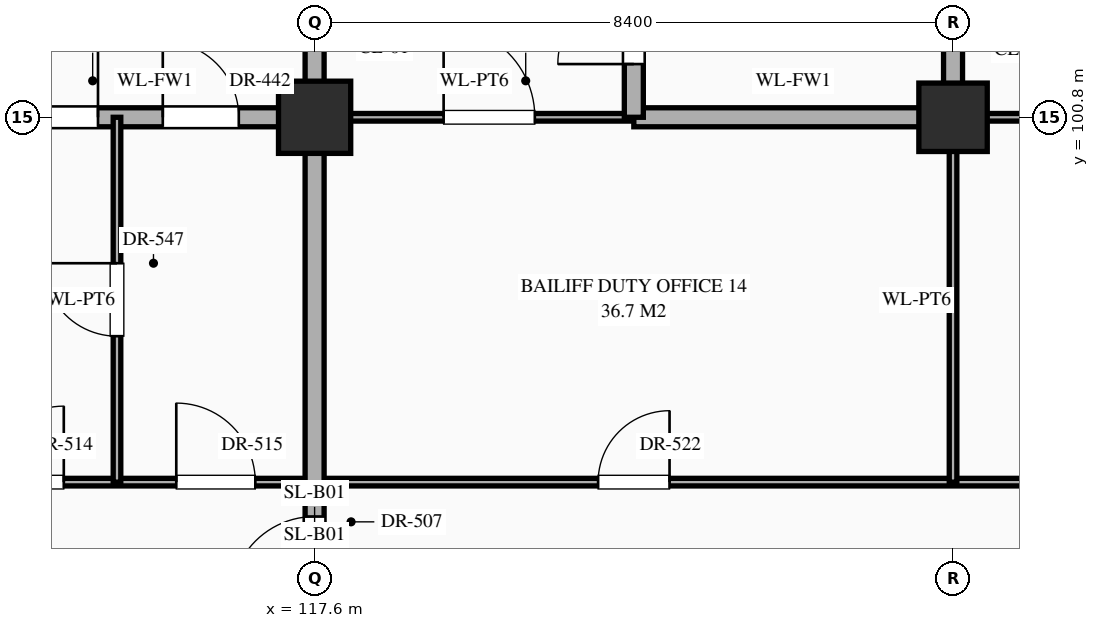
"""IFC4 building model, lengths in metres.
Left out: names, types, materials, properties, quantities, classifications, styles, units other than length and angle.
Written with IfcOpenShell. Run it as: python <this file> out.ifc"""

import sys

from ifc_helpers import new_model, si_unit, direction, frame, frame_2d, origin, origin_2d, place, context, subcontext, project, spatial, rectangle, extrude, element, fill, save


model = new_model("IFC4")
c1 = context("Model", 3, precision=1e-05, world=origin(), true_north=direction((0.0, 1.0)))
c2 = subcontext(c1, "Body", "Model", "MODEL_VIEW")
j1 = project(units=[si_unit("LENGTHUNIT", "METRE"), si_unit("PLANEANGLEUNIT", "RADIAN")], contexts=[c1])
p1 = place(None, origin())
s1 = spatial("IfcSite", under=j1, at=p1, CompositionType="ELEMENT")
p2 = place(p1, origin())
s2 = spatial("IfcBuilding", under=s1, at=p2, CompositionType="ELEMENT")
p3 = place(p2, frame((0.0, 0.0, -5.4)))
s3 = spatial("IfcBuildingStorey", under=s2, at=p3, CompositionType="ELEMENT", Elevation=-5.4)
p4 = place(p3, frame((117.6, 100.8, 0.0), z_axis=(0.0, 0.0, 1.0), x_axis=(1.0, 0.0, 0.0)))
e1 = element("IfcColumn", 1, at=p4, inside=s3, PredefinedType="COLUMN", context=c2, shape_type="SweptSolid", body=[
    extrude(rectangle(XDim=0.95, YDim=0.95, at=origin_2d()), origin(), (0.0, 0.0, 1.0), 5.4),
])
p5 = place(p3, frame((126.0, 100.8, 0.0), z_axis=(0.0, 0.0, 1.0), x_axis=(1.0, 0.0, 0.0)))
e2 = element("IfcColumn", 2, at=p5, inside=s3, PredefinedType="COLUMN", context=c2, shape_type="SweptSolid", body=[
    extrude(rectangle(XDim=0.9, YDim=0.9, at=origin_2d()), origin(), (0.0, 0.0, 1.0), 5.4),
])
p6 = place(p3, frame((16.8, 96.0, 0.0), z_axis=(0.0, 0.0, 1.0), x_axis=(1.0, 0.0, 0.0)))
e3 = element("IfcWall", 3, at=p6, inside=s3, PredefinedType="STANDARD", context=c2, shape_type="SweptSolid", body=[
    extrude(rectangle(XDim=134.4, YDim=0.1, at=frame_2d((67.2, 0.0))), origin(), (0.0, 0.0, 1.0), 5.1),
])
p7 = place(p6, frame((3.56, 0.0, 0.0)))
e4 = element("IfcOpeningElement", 4, at=p7, cuts=e3, PredefinedType="OPENING", context=c2, shape_type="SweptSolid", body=[
    extrude(rectangle(XDim=1.28, YDim=2.35, at=frame_2d((0.64, 1.175))), frame((0.0, 0.062, 0.0), z_axis=(0.0, -1.0, 0.0), x_axis=(1.0, 0.0, 0.0)), (0.0, 0.0, 1.0), 0.124),
])
p8 = place(p6, frame((9.63, 0.0, 0.0)))
e5 = element("IfcOpeningElement", 5, at=p8, cuts=e3, PredefinedType="OPENING", context=c2, shape_type="SweptSolid", body=[
    extrude(rectangle(XDim=0.94, YDim=2.3, at=frame_2d((0.47, 1.15))), frame((0.0, 0.062, 0.0), z_axis=(0.0, -1.0, 0.0), x_axis=(1.0, 0.0, 0.0)), (0.0, 0.0, 1.0), 0.124),
])
p9 = place(p6, frame((12.51, 0.0, 0.0)))
e6 = element("IfcOpeningElement", 6, at=p9, cuts=e3, PredefinedType="OPENING", context=c2, shape_type="SweptSolid", body=[
    extrude(rectangle(XDim=0.98, YDim=2.35, at=frame_2d((0.49, 1.175))), frame((0.0, 0.062, 0.0), z_axis=(0.0, -1.0, 0.0), x_axis=(1.0, 0.0, 0.0)), (0.0, 0.0, 1.0), 0.124),
])
p10 = place(p6, frame((14.99, 0.0, 0.0)))
e7 = element("IfcOpeningElement", 7, at=p10, cuts=e3, PredefinedType="OPENING", context=c2, shape_type="SweptSolid", body=[
    extrude(rectangle(XDim=1.02, YDim=2.4, at=frame_2d((0.51, 1.2))), frame((0.0, 0.062, 0.0), z_axis=(0.0, -1.0, 0.0), x_axis=(1.0, 0.0, 0.0)), (0.0, 0.0, 1.0), 0.124),
])
p11 = place(p6, frame((20.47, 0.0, 0.0)))
e8 = element("IfcOpeningElement", 8, at=p11, cuts=e3, PredefinedType="OPENING", context=c2, shape_type="SweptSolid", body=[
    extrude(rectangle(XDim=1.06, YDim=2.4, at=frame_2d((0.53, 1.2))), frame((0.0, 0.062, 0.0), z_axis=(0.0, -1.0, 0.0), x_axis=(1.0, 0.0, 0.0)), (0.0, 0.0, 1.0), 0.124),
])
p12 = place(p6, frame((28.83, 0.0, 0.0)))
e9 = element("IfcOpeningElement", 9, at=p12, cuts=e3, PredefinedType="OPENING", context=c2, shape_type="SweptSolid", body=[
    extrude(rectangle(XDim=1.14, YDim=2.4, at=frame_2d((0.57, 1.2))), frame((0.0, 0.062, 0.0), z_axis=(0.0, -1.0, 0.0), x_axis=(1.0, 0.0, 0.0)), (0.0, 0.0, 1.0), 0.124),
])
p13 = place(p6, frame((34.78, 0.0, 0.0)))
e10 = element("IfcOpeningElement", 10, at=p13, cuts=e3, PredefinedType="OPENING", context=c2, shape_type="SweptSolid", body=[
    extrude(rectangle(XDim=1.04, YDim=2.2, at=frame_2d((0.52, 1.1))), frame((0.0, 0.062, 0.0), z_axis=(0.0, -1.0, 0.0), x_axis=(1.0, 0.0, 0.0)), (0.0, 0.0, 1.0), 0.124),
])
p14 = place(p6, frame((37.66, 0.0, 0.0)))
e11 = element("IfcOpeningElement", 11, at=p14, cuts=e3, PredefinedType="OPENING", context=c2, shape_type="SweptSolid", body=[
    extrude(rectangle(XDim=1.08, YDim=2.25, at=frame_2d((0.54, 1.125))), frame((0.0, 0.062, 0.0), z_axis=(0.0, -1.0, 0.0), x_axis=(1.0, 0.0, 0.0)), (0.0, 0.0, 1.0), 0.124),
])
p15 = place(p6, frame((40.14, 0.0, 0.0)))
e12 = element("IfcOpeningElement", 12, at=p15, cuts=e3, PredefinedType="OPENING", context=c2, shape_type="SweptSolid", body=[
    extrude(rectangle(XDim=1.12, YDim=2.25, at=frame_2d((0.56, 1.125))), frame((0.0, 0.062, 0.0), z_axis=(0.0, -1.0, 0.0), x_axis=(1.0, 0.0, 0.0)), (0.0, 0.0, 1.0), 0.124),
])
p16 = place(p6, frame((45.62, 0.0, 0.0)))
e13 = element("IfcOpeningElement", 13, at=p16, cuts=e3, PredefinedType="OPENING", context=c2, shape_type="SweptSolid", body=[
    extrude(rectangle(XDim=1.16, YDim=2.3, at=frame_2d((0.58, 1.15))), frame((0.0, 0.062, 0.0), z_axis=(0.0, -1.0, 0.0), x_axis=(1.0, 0.0, 0.0)), (0.0, 0.0, 1.0), 0.124),
])
p17 = place(p6, frame((54.0, 0.0, 0.0)))
e14 = element("IfcOpeningElement", 14, at=p17, cuts=e3, PredefinedType="OPENING", context=c2, shape_type="SweptSolid", body=[
    extrude(rectangle(XDim=1.2, YDim=2.35, at=frame_2d((0.6, 1.175))), frame((0.0, 0.062, 0.0), z_axis=(0.0, -1.0, 0.0), x_axis=(1.0, 0.0, 0.0)), (0.0, 0.0, 1.0), 0.124),
])
p18 = place(p6, frame((62.38, 0.0, 0.0)))
e15 = element("IfcOpeningElement", 15, at=p18, cuts=e3, PredefinedType="OPENING", context=c2, shape_type="SweptSolid", body=[
    extrude(rectangle(XDim=1.24, YDim=2.3, at=frame_2d((0.62, 1.15))), frame((0.0, 0.062, 0.0), z_axis=(0.0, -1.0, 0.0), x_axis=(1.0, 0.0, 0.0)), (0.0, 0.0, 1.0), 0.124),
])
p19 = place(p6, frame((68.37, 0.0, 0.0)))
e16 = element("IfcOpeningElement", 16, at=p19, cuts=e3, PredefinedType="OPENING", context=c2, shape_type="SweptSolid", body=[
    extrude(rectangle(XDim=1.06, YDim=2.4, at=frame_2d((0.53, 1.2))), frame((0.0, 0.062, 0.0), z_axis=(0.0, -1.0, 0.0), x_axis=(1.0, 0.0, 0.0)), (0.0, 0.0, 1.0), 0.124),
])
p20 = place(p6, frame((71.23, 0.0, 0.0)))
e17 = element("IfcOpeningElement", 17, at=p20, cuts=e3, PredefinedType="OPENING", context=c2, shape_type="SweptSolid", body=[
    extrude(rectangle(XDim=1.14, YDim=2.4, at=frame_2d((0.57, 1.2))), frame((0.0, 0.062, 0.0), z_axis=(0.0, -1.0, 0.0), x_axis=(1.0, 0.0, 0.0)), (0.0, 0.0, 1.0), 0.124),
])
p21 = place(p6, frame((73.85, 0.0, 0.0)))
e18 = element("IfcOpeningElement", 18, at=p21, cuts=e3, PredefinedType="OPENING", context=c2, shape_type="SweptSolid", body=[
    extrude(rectangle(XDim=0.9, YDim=2.15, at=frame_2d((0.45, 1.075))), frame((0.0, 0.062, 0.0), z_axis=(0.0, -1.0, 0.0), x_axis=(1.0, 0.0, 0.0)), (0.0, 0.0, 1.0), 0.124),
])
p22 = place(p6, frame((79.37, 0.0, 0.0)))
e19 = element("IfcOpeningElement", 19, at=p22, cuts=e3, PredefinedType="OPENING", context=c2, shape_type="SweptSolid", body=[
    extrude(rectangle(XDim=0.86, YDim=2.1, at=frame_2d((0.43, 1.05))), frame((0.0, 0.062, 0.0), z_axis=(0.0, -1.0, 0.0), x_axis=(1.0, 0.0, 0.0)), (0.0, 0.0, 1.0), 0.124),
])
p23 = place(p6, frame((87.74, 0.0, 0.0)))
e20 = element("IfcOpeningElement", 20, at=p23, cuts=e3, PredefinedType="OPENING", context=c2, shape_type="SweptSolid", body=[
    extrude(rectangle(XDim=0.92, YDim=2.15, at=frame_2d((0.46, 1.075))), frame((0.0, 0.062, 0.0), z_axis=(0.0, -1.0, 0.0), x_axis=(1.0, 0.0, 0.0)), (0.0, 0.0, 1.0), 0.124),
])
p24 = place(p6, frame((93.62, 0.0, 0.0)))
e21 = element("IfcOpeningElement", 21, at=p24, cuts=e3, PredefinedType="OPENING", context=c2, shape_type="SweptSolid", body=[
    extrude(rectangle(XDim=0.96, YDim=2.2, at=frame_2d((0.48, 1.1))), frame((0.0, 0.062, 0.0), z_axis=(0.0, -1.0, 0.0), x_axis=(1.0, 0.0, 0.0)), (0.0, 0.0, 1.0), 0.124),
])
p25 = place(p6, frame((96.5, 0.0, 0.0)))
e22 = element("IfcOpeningElement", 22, at=p25, cuts=e3, PredefinedType="OPENING", context=c2, shape_type="SweptSolid", body=[
    extrude(rectangle(XDim=1.0, YDim=2.25, at=frame_2d((0.5, 1.125))), frame((0.0, 0.062, 0.0), z_axis=(0.0, -1.0, 0.0), x_axis=(1.0, 0.0, 0.0)), (0.0, 0.0, 1.0), 0.124),
])
p26 = place(p6, frame((98.98, 0.0, 0.0)))
e23 = element("IfcOpeningElement", 23, at=p26, cuts=e3, PredefinedType="OPENING", context=c2, shape_type="SweptSolid", body=[
    extrude(rectangle(XDim=1.04, YDim=2.2, at=frame_2d((0.52, 1.1))), frame((0.0, 0.062, 0.0), z_axis=(0.0, -1.0, 0.0), x_axis=(1.0, 0.0, 0.0)), (0.0, 0.0, 1.0), 0.124),
])
p27 = place(p6, frame((104.53, 0.0, 0.0)))
e24 = element("IfcOpeningElement", 24, at=p27, cuts=e3, PredefinedType="OPENING", context=c2, shape_type="SweptSolid", body=[
    extrude(rectangle(XDim=0.94, YDim=2.3, at=frame_2d((0.47, 1.15))), frame((0.0, 0.062, 0.0), z_axis=(0.0, -1.0, 0.0), x_axis=(1.0, 0.0, 0.0)), (0.0, 0.0, 1.0), 0.124),
])
p28 = place(p6, frame((112.91, 0.0, 0.0)))
e25 = element("IfcOpeningElement", 25, at=p28, cuts=e3, PredefinedType="OPENING", context=c2, shape_type="SweptSolid", body=[
    extrude(rectangle(XDim=0.98, YDim=2.35, at=frame_2d((0.49, 1.175))), frame((0.0, 0.062, 0.0), z_axis=(0.0, -1.0, 0.0), x_axis=(1.0, 0.0, 0.0)), (0.0, 0.0, 1.0), 0.124),
])
p29 = place(p6, frame((118.79, 0.0, 0.0)))
e26 = element("IfcOpeningElement", 26, at=p29, cuts=e3, PredefinedType="OPENING", context=c2, shape_type="SweptSolid", body=[
    extrude(rectangle(XDim=1.02, YDim=2.4, at=frame_2d((0.51, 1.2))), frame((0.0, 0.062, 0.0), z_axis=(0.0, -1.0, 0.0), x_axis=(1.0, 0.0, 0.0)), (0.0, 0.0, 1.0), 0.124),
])
p30 = place(p6, frame((121.67, 0.0, 0.0)))
e27 = element("IfcOpeningElement", 27, at=p30, cuts=e3, PredefinedType="OPENING", context=c2, shape_type="SweptSolid", body=[
    extrude(rectangle(XDim=1.06, YDim=2.4, at=frame_2d((0.53, 1.2))), frame((0.0, 0.062, 0.0), z_axis=(0.0, -1.0, 0.0), x_axis=(1.0, 0.0, 0.0)), (0.0, 0.0, 1.0), 0.124),
])
p31 = place(p6, frame((124.13, 0.0, 0.0)))
e28 = element("IfcOpeningElement", 28, at=p31, cuts=e3, PredefinedType="OPENING", context=c2, shape_type="SweptSolid", body=[
    extrude(rectangle(XDim=1.14, YDim=2.4, at=frame_2d((0.57, 1.2))), frame((0.0, 0.062, 0.0), z_axis=(0.0, -1.0, 0.0), x_axis=(1.0, 0.0, 0.0)), (0.0, 0.0, 1.0), 0.124),
])
p32 = place(p6, frame((129.75, 0.0, 0.0)))
e29 = element("IfcOpeningElement", 29, at=p32, cuts=e3, PredefinedType="OPENING", context=c2, shape_type="SweptSolid", body=[
    extrude(rectangle(XDim=0.9, YDim=2.15, at=frame_2d((0.45, 1.075))), frame((0.0, 0.062, 0.0), z_axis=(0.0, -1.0, 0.0), x_axis=(1.0, 0.0, 0.0)), (0.0, 0.0, 1.0), 0.124),
])
p33 = place(p3, frame((113.4, 100.8, 0.0), z_axis=(0.0, 0.0, 1.0), x_axis=(1.0, 0.0, 0.0)))
e30 = element("IfcWall", 30, at=p33, inside=s3, PredefinedType="STANDARD", context=c2, shape_type="SweptSolid", body=[
    extrude(rectangle(XDim=4.2, YDim=0.25, at=frame_2d((2.1, 0.0))), origin(), (0.0, 0.0, 1.0), 4.25),
])
p34 = place(p33, frame((0.25, 0.0, 0.0)))
e31 = element("IfcOpeningElement", 31, at=p34, cuts=e30, PredefinedType="OPENING", context=c2, shape_type="SweptSolid", body=[
    extrude(rectangle(XDim=1.1, YDim=2.2, at=frame_2d((0.55, 1.1))), frame((0.0, 0.137, 0.0), z_axis=(0.0, -1.0, 0.0), x_axis=(1.0, 0.0, 0.0)), (0.0, 0.0, 1.0), 0.274),
])
p35 = place(p33, frame((2.202, 0.0, 0.0)))
e32 = element("IfcOpeningElement", 32, at=p35, cuts=e30, PredefinedType="OPENING", context=c2, shape_type="SweptSolid", body=[
    extrude(rectangle(XDim=1.0, YDim=2.2, at=frame_2d((0.5, 1.1))), frame((0.0, 0.137, 0.0), z_axis=(0.0, -1.0, 0.0), x_axis=(1.0, 0.0, 0.0)), (0.0, 0.0, 1.0), 0.274),
])
p36 = place(p3, frame((117.6, 100.8, 0.0), z_axis=(0.0, 0.0, 1.0), x_axis=(1.0, 0.0, 0.0)))
e33 = element("IfcWall", 33, at=p36, inside=s3, PredefinedType="STANDARD", context=c2, shape_type="SweptSolid", body=[
    extrude(rectangle(XDim=4.2, YDim=0.1, at=frame_2d((2.1, 0.0))), origin(), (0.0, 0.0, 1.0), 4.25),
])
p37 = place(p36, frame((1.698, 0.0, 0.0)))
e34 = element("IfcOpeningElement", 34, at=p37, cuts=e33, PredefinedType="OPENING", context=c2, shape_type="SweptSolid", body=[
    extrude(rectangle(XDim=1.2, YDim=2.35, at=frame_2d((0.6, 1.175))), frame((0.0, 0.062, 0.0), z_axis=(0.0, -1.0, 0.0), x_axis=(1.0, 0.0, 0.0)), (0.0, 0.0, 1.0), 0.124),
])
p38 = place(p3, frame((121.8, 100.8, 0.0), z_axis=(0.0, 0.0, 1.0), x_axis=(1.0, 0.0, 0.0)))
e35 = element("IfcWall", 35, at=p38, inside=s3, PredefinedType="STANDARD", context=c2, shape_type="SweptSolid", body=[
    extrude(rectangle(XDim=4.2, YDim=0.25, at=frame_2d((2.1, 0.0))), origin(), (0.0, 0.0, 1.0), 4.25),
])
p39 = place(p3, frame((126.0, 100.8, 0.0), z_axis=(0.0, 0.0, 1.0), x_axis=(1.0, 0.0, 0.0)))
e36 = element("IfcWall", 36, at=p39, inside=s3, PredefinedType="STANDARD", context=c2, shape_type="SweptSolid", body=[
    extrude(rectangle(XDim=25.2, YDim=0.1, at=frame_2d((12.6, 0.0))), origin(), (0.0, 0.0, 1.0), 4.25),
])
p40 = place(p39, frame((3.72, 0.0, 0.0)))
e37 = element("IfcOpeningElement", 37, at=p40, cuts=e36, PredefinedType="OPENING", context=c2, shape_type="SweptSolid", body=[
    extrude(rectangle(XDim=0.96, YDim=2.2, at=frame_2d((0.48, 1.1))), frame((0.0, 0.062, 0.0), z_axis=(0.0, -1.0, 0.0), x_axis=(1.0, 0.0, 0.0)), (0.0, 0.0, 1.0), 0.124),
])
p41 = place(p39, frame((9.785, 0.0, 0.0)))
e38 = element("IfcOpeningElement", 38, at=p41, cuts=e36, PredefinedType="OPENING", context=c2, shape_type="SweptSolid", body=[
    extrude(rectangle(XDim=1.0, YDim=2.25, at=frame_2d((0.5, 1.125))), frame((0.0, 0.062, 0.0), z_axis=(0.0, -1.0, 0.0), x_axis=(1.0, 0.0, 0.0)), (0.0, 0.0, 1.0), 0.124),
])
p42 = place(p39, frame((12.48, 0.0, 0.0)))
e39 = element("IfcOpeningElement", 39, at=p42, cuts=e36, PredefinedType="OPENING", context=c2, shape_type="SweptSolid", body=[
    extrude(rectangle(XDim=1.04, YDim=2.2, at=frame_2d((0.52, 1.1))), frame((0.0, 0.062, 0.0), z_axis=(0.0, -1.0, 0.0), x_axis=(1.0, 0.0, 0.0)), (0.0, 0.0, 1.0), 0.124),
])
p43 = place(p39, frame((14.775, 0.0, 0.0)))
e40 = element("IfcOpeningElement", 40, at=p43, cuts=e36, PredefinedType="OPENING", context=c2, shape_type="SweptSolid", body=[
    extrude(rectangle(XDim=1.08, YDim=2.25, at=frame_2d((0.54, 1.125))), frame((0.0, 0.062, 0.0), z_axis=(0.0, -1.0, 0.0), x_axis=(1.0, 0.0, 0.0)), (0.0, 0.0, 1.0), 0.124),
])
p44 = place(p39, frame((20.452, 0.0, 0.0)))
e41 = element("IfcOpeningElement", 41, at=p44, cuts=e36, PredefinedType="OPENING", context=c2, shape_type="SweptSolid", body=[
    extrude(rectangle(XDim=1.12, YDim=2.25, at=frame_2d((0.56, 1.125))), frame((0.0, 0.062, 0.0), z_axis=(0.0, -1.0, 0.0), x_axis=(1.0, 0.0, 0.0)), (0.0, 0.0, 1.0), 0.124),
])
p45 = place(p3, frame((115.0, 96.0, 0.0), z_axis=(0.0, 0.0, 1.0), x_axis=(0.0, 1.0, 0.0)))
e42 = element("IfcWall", 42, at=p45, inside=s3, PredefinedType="STANDARD", context=c2, shape_type="SweptSolid", body=[
    extrude(rectangle(XDim=4.8, YDim=0.1, at=frame_2d((2.4, 0.0))), origin(), (0.0, 0.0, 1.0), 5.1),
])
p46 = place(p45, frame((1.92, 0.0, 0.0)))
e43 = element("IfcOpeningElement", 43, at=p46, cuts=e42, PredefinedType="OPENING", context=c2, shape_type="SweptSolid", body=[
    extrude(rectangle(XDim=0.96, YDim=2.2, at=frame_2d((0.48, 1.1))), frame((0.0, 0.062, 0.0), z_axis=(0.0, -1.0, 0.0), x_axis=(1.0, 0.0, 0.0)), (0.0, 0.0, 1.0), 0.124),
])
p47 = place(p3, frame((117.6, 91.2, 0.0), z_axis=(0.0, 0.0, 1.0), x_axis=(0.0, 1.0, 0.0)))
e44 = element("IfcWall", 44, at=p47, inside=s3, PredefinedType="STANDARD", context=c2, shape_type="SweptSolid", body=[
    extrude(rectangle(XDim=13.2, YDim=0.25, at=frame_2d((6.6, 0.0))), origin(), (0.0, 0.0, 1.0), 4.35),
])
p48 = place(p47, frame((0.502, 0.0, 0.0)))
e45 = element("IfcOpeningElement", 45, at=p48, cuts=e44, PredefinedType="OPENING", context=c2, shape_type="SweptSolid", body=[
    extrude(rectangle(XDim=1.0, YDim=2.2, at=frame_2d((0.5, 1.1))), frame((0.0, 0.137, 0.0), z_axis=(0.0, -1.0, 0.0), x_axis=(1.0, 0.0, 0.0)), (0.0, 0.0, 1.0), 0.274),
])
p49 = place(p47, frame((10.522, 0.0, 0.0)))
e46 = element("IfcOpeningElement", 46, at=p49, cuts=e44, PredefinedType="OPENING", context=c2, shape_type="SweptSolid", body=[
    extrude(rectangle(XDim=0.95, YDim=2.15, at=frame_2d((0.475, 1.075))), frame((0.0, 0.137, 0.0), z_axis=(0.0, -1.0, 0.0), x_axis=(1.0, 0.0, 0.0)), (0.0, 0.0, 1.0), 0.274),
])
p50 = place(p47, frame((3.248, 0.0, 0.0)))
e47 = element("IfcOpeningElement", 47, at=p50, cuts=e44, PredefinedType="OPENING", context=c2, shape_type="SweptSolid", body=[
    extrude(rectangle(XDim=1.1, YDim=2.2, at=frame_2d((0.55, 1.1))), frame((0.0, 0.137, 0.0), z_axis=(0.0, -1.0, 0.0), x_axis=(1.0, 0.0, 0.0)), (0.0, 0.0, 1.0), 0.274),
])
p51 = place(p3, frame((121.8, 100.8, 0.0), z_axis=(0.0, 0.0, 1.0), x_axis=(0.0, 1.0, 0.0)))
e48 = element("IfcWall", 48, at=p51, inside=s3, PredefinedType="STANDARD", context=c2, shape_type="SweptSolid", body=[
    extrude(rectangle(XDim=3.6, YDim=0.25, at=frame_2d((1.8, 0.0))), origin(), (0.0, 0.0, 1.0), 4.55),
])
p52 = place(p51, frame((0.7, 0.0, 0.0)))
e49 = element("IfcOpeningElement", 49, at=p52, cuts=e48, PredefinedType="OPENING", context=c2, shape_type="SweptSolid", body=[
    extrude(rectangle(XDim=1.0, YDim=2.2, at=frame_2d((0.5, 1.1))), frame((0.0, 0.137, 0.0), z_axis=(0.0, -1.0, 0.0), x_axis=(1.0, 0.0, 0.0)), (0.0, 0.0, 1.0), 0.274),
])
p53 = place(p3, frame((126.0, 96.0, 0.0), z_axis=(0.0, 0.0, 1.0), x_axis=(0.0, 1.0, 0.0)))
e50 = element("IfcWall", 50, at=p53, inside=s3, PredefinedType="STANDARD", context=c2, shape_type="SweptSolid", body=[
    extrude(rectangle(XDim=4.8, YDim=0.1, at=frame_2d((2.4, 0.0))), origin(), (0.0, 0.0, 1.0), 4.35),
])
p54 = place(p3, frame((126.0, 100.8, 0.0), z_axis=(0.0, 0.0, 1.0), x_axis=(0.0, 1.0, 0.0)))
e51 = element("IfcWall", 51, at=p54, inside=s3, PredefinedType="STANDARD", context=c2, shape_type="SweptSolid", body=[
    extrude(rectangle(XDim=3.6, YDim=0.25, at=frame_2d((1.8, 0.0))), origin(), (0.0, 0.0, 1.0), 4.35),
])
p55 = place(p54, frame((0.91, 0.0, 0.0)))
e52 = element("IfcOpeningElement", 52, at=p55, cuts=e51, PredefinedType="OPENING", context=c2, shape_type="SweptSolid", body=[
    extrude(rectangle(XDim=0.95, YDim=2.15, at=frame_2d((0.475, 1.075))), frame((0.0, 0.137, 0.0), z_axis=(0.0, -1.0, 0.0), x_axis=(1.0, 0.0, 0.0)), (0.0, 0.0, 1.0), 0.274),
])
p56 = place(p52, origin())
e53 = element("IfcDoor", 53, at=p56, inside=s3, OperationType="SINGLE_SWING_LEFT", PredefinedType="DOOR", context=c2, shape_type="SweptSolid", body=[
    extrude(rectangle(XDim=1.0, YDim=2.2, at=frame_2d((0.5, 1.1))), frame((0.0, 0.025, 0.0), z_axis=(0.0, -1.0, 0.0), x_axis=(1.0, 0.0, 0.0)), (0.0, 0.0, 1.0), 0.05),
])
fill(e49, e53)
p57 = place(p37, origin())
e54 = element("IfcDoor", 54, at=p57, inside=s3, OperationType="SINGLE_SWING_LEFT", PredefinedType="DOOR", context=c2, shape_type="SweptSolid", body=[
    extrude(rectangle(XDim=1.2, YDim=2.35, at=frame_2d((0.6, 1.175))), frame((0.0, 0.025, 0.0), z_axis=(0.0, -1.0, 0.0), x_axis=(1.0, 0.0, 0.0)), (0.0, 0.0, 1.0), 0.05),
])
fill(e34, e54)
p58 = place(p34, origin())
e55 = element("IfcDoor", 55, at=p58, inside=s3, OperationType="SINGLE_SWING_RIGHT", PredefinedType="DOOR", context=c2, shape_type="SweptSolid", body=[
    extrude(rectangle(XDim=1.1, YDim=2.2, at=frame_2d((0.55, 1.1))), frame((0.0, 0.025, 0.0), z_axis=(0.0, -1.0, 0.0), x_axis=(1.0, 0.0, 0.0)), (0.0, 0.0, 1.0), 0.05),
])
fill(e31, e55)
p59 = place(p35, origin())
e56 = element("IfcDoor", 56, at=p59, inside=s3, OperationType="SINGLE_SWING_LEFT", PredefinedType="DOOR", context=c2, shape_type="SweptSolid", body=[
    extrude(rectangle(XDim=1.0, YDim=2.2, at=frame_2d((0.5, 1.1))), frame((0.0, 0.025, 0.0), z_axis=(0.0, -1.0, 0.0), x_axis=(1.0, 0.0, 0.0)), (0.0, 0.0, 1.0), 0.05),
])
fill(e32, e56)
p60 = place(p50, origin())
e57 = element("IfcDoor", 57, at=p60, inside=s3, OperationType="SINGLE_SWING_LEFT", PredefinedType="DOOR", context=c2, shape_type="SweptSolid", body=[
    extrude(rectangle(XDim=1.1, YDim=2.2, at=frame_2d((0.55, 1.1))), frame((0.0, 0.025, 0.0), z_axis=(0.0, -1.0, 0.0), x_axis=(1.0, 0.0, 0.0)), (0.0, 0.0, 1.0), 0.05),
])
fill(e47, e57)
p61 = place(p25, origin())
e58 = element("IfcDoor", 58, at=p61, inside=s3, OperationType="SINGLE_SWING_RIGHT", PredefinedType="DOOR", context=c2, shape_type="SweptSolid", body=[
    extrude(rectangle(XDim=1.0, YDim=2.25, at=frame_2d((0.5, 1.125))), frame((0.0, 0.025, 0.0), z_axis=(0.0, -1.0, 0.0), x_axis=(1.0, 0.0, 0.0)), (0.0, 0.0, 1.0), 0.05),
])
fill(e22, e58)
p62 = place(p26, origin())
e59 = element("IfcDoor", 59, at=p62, inside=s3, OperationType="SINGLE_SWING_LEFT", PredefinedType="DOOR", context=c2, shape_type="SweptSolid", body=[
    extrude(rectangle(XDim=1.04, YDim=2.2, at=frame_2d((0.52, 1.1))), frame((0.0, 0.025, 0.0), z_axis=(0.0, -1.0, 0.0), x_axis=(1.0, 0.0, 0.0)), (0.0, 0.0, 1.0), 0.05),
])
fill(e23, e59)
p63 = place(p27, origin())
e60 = element("IfcDoor", 60, at=p63, inside=s3, OperationType="SINGLE_SWING_RIGHT", PredefinedType="DOOR", context=c2, shape_type="SweptSolid", body=[
    extrude(rectangle(XDim=0.94, YDim=2.3, at=frame_2d((0.47, 1.15))), frame((0.0, 0.025, 0.0), z_axis=(0.0, -1.0, 0.0), x_axis=(1.0, 0.0, 0.0)), (0.0, 0.0, 1.0), 0.05),
])
fill(e24, e60)
p64 = place(p46, origin())
e61 = element("IfcDoor", 61, at=p64, inside=s3, OperationType="SINGLE_SWING_RIGHT", PredefinedType="DOOR", context=c2, shape_type="SweptSolid", body=[
    extrude(rectangle(XDim=0.96, YDim=2.2, at=frame_2d((0.48, 1.1))), frame((0.0, 0.025, 0.0), z_axis=(0.0, -1.0, 0.0), x_axis=(1.0, 0.0, 0.0)), (0.0, 0.0, 1.0), 0.05),
])
fill(e43, e61)
save(model, sys.argv[1])
